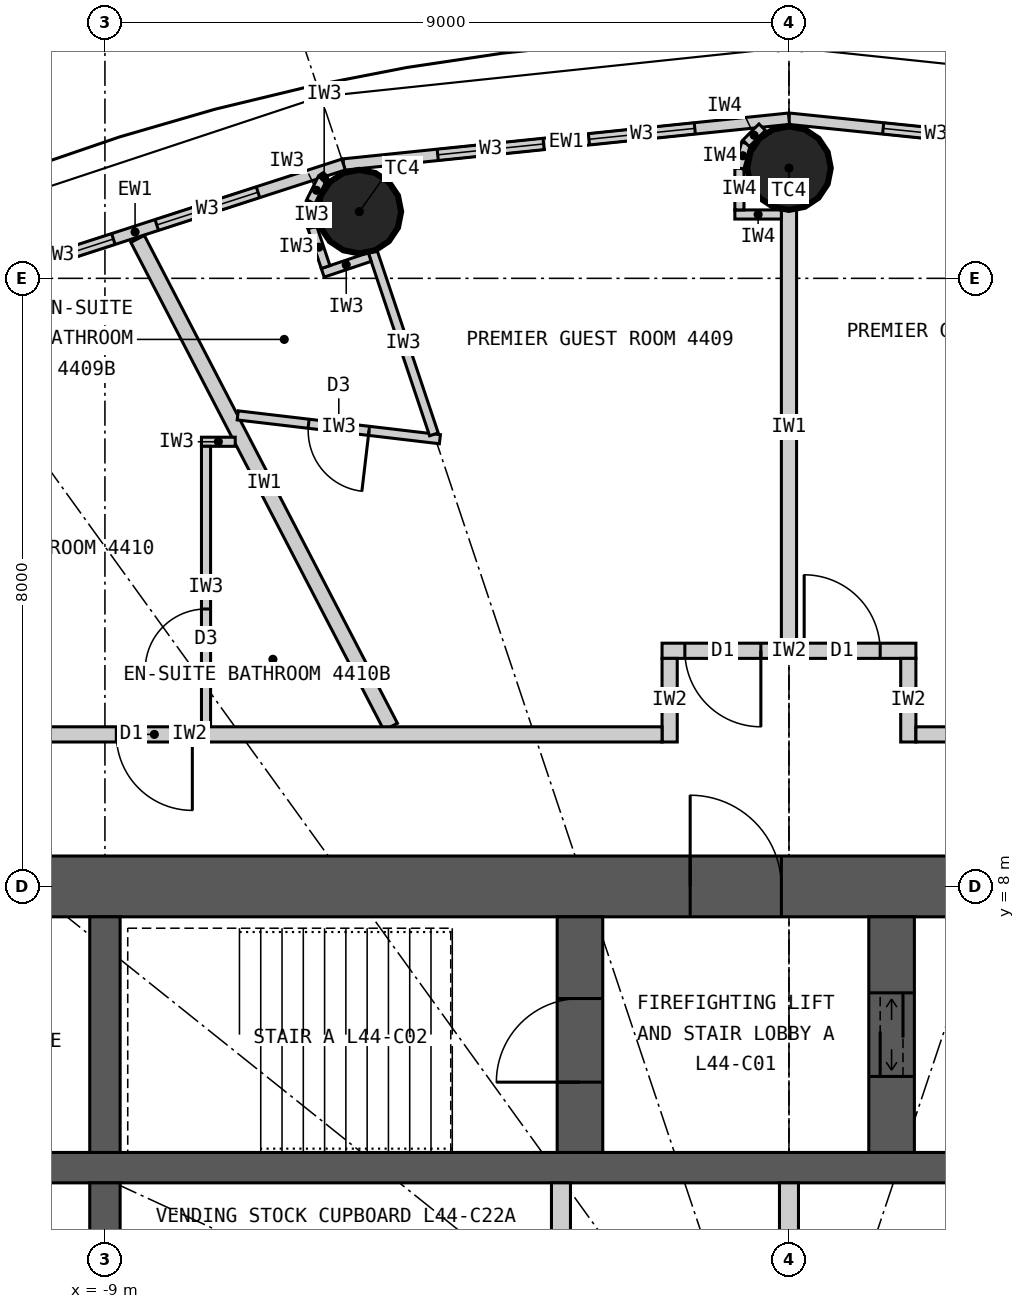
"""IFC4 building model, lengths in metres.
Left out: names, types, materials, properties, quantities, classifications, styles, units other than length and angle.
Written with IfcOpenShell. Run it as: python <this file> out.ifc"""

import sys

from ifc_helpers import new_model, si_unit, direction, frame, frame_2d, origin, origin_2d, place, context, subcontext, project, spatial, rectangle, circle, extrude, element, fill, save


model = new_model("IFC4")
c1 = context("Model", 3, precision=1e-05, world=origin(), true_north=direction((0.0, 1.0)))
c2 = subcontext(c1, "Body", "Model", "MODEL_VIEW")
j1 = project(units=[si_unit("LENGTHUNIT", "METRE"), si_unit("PLANEANGLEUNIT", "RADIAN")], contexts=[c1])
p1 = place(None, origin())
s1 = spatial("IfcSite", under=j1, at=p1, CompositionType="ELEMENT")
p2 = place(p1, origin())
s2 = spatial("IfcBuilding", under=s1, at=p2, CompositionType="ELEMENT")
p3 = place(p2, frame((0.0, 0.0, 166.5)))
s3 = spatial("IfcBuildingStorey", under=s2, at=p3, CompositionType="ELEMENT", Elevation=166.5)
for number, where, z_axis, x_axis in (
    (1, (0.0, 17.45, 0.0), (0.0, 0.0, 1.0), (1.0, 0.0, 0.0)),
    (2, (-5.653, 16.877, 0.0), (0.0, 0.0, 1.0), (1.0, 0.0, 0.0)),
):
    element("IfcColumn", number, at=place(p3, frame(where, z_axis=z_axis, x_axis=x_axis)), inside=s3, PredefinedType="COLUMN", context=c2, shape_type="SweptSolid", body=[
        extrude(circle(Radius=0.55, at=origin_2d()), origin(), (0.0, 0.0, 1.0), 3.3),
    ])
p4 = place(p3, frame((-12.4, 8.0, 0.0), z_axis=(0.0, 0.0, 1.0), x_axis=(1.0, 0.0, 0.0)))
e3 = element("IfcWall", 3, at=p4, inside=s3, PredefinedType="SHEAR", context=c2, shape_type="SweptSolid", body=[
    extrude(rectangle(XDim=24.8, YDim=0.8, at=frame_2d((12.4, 0.0))), origin(), (0.0, 0.0, 1.0), 3.3),
])
p5 = place(p4, frame((11.1, 0.0, 0.0)))
e4 = element("IfcOpeningElement", 4, at=p5, cuts=e3, PredefinedType="OPENING", context=c2, shape_type="SweptSolid", body=[
    extrude(rectangle(XDim=1.2, YDim=2.2, at=frame_2d((0.6, 1.1))), frame((0.0, 0.41, 0.0), z_axis=(0.0, -1.0, 0.0), x_axis=(1.0, 0.0, 0.0)), (0.0, 0.0, 1.0), 0.82),
])
p6 = place(p4, frame((18.7, 0.0, 0.0)))
e5 = element("IfcOpeningElement", 5, at=p6, cuts=e3, PredefinedType="OPENING", context=c2, shape_type="SweptSolid", body=[
    extrude(rectangle(XDim=0.9, YDim=2.2, at=frame_2d((0.45, 1.1))), frame((0.0, 0.41, 0.0), z_axis=(0.0, -1.0, 0.0), x_axis=(1.0, 0.0, 0.0)), (0.0, 0.0, 1.0), 0.82),
])
p7 = place(p3, frame((-11.6, 4.3, 0.0), z_axis=(0.0, 0.0, 1.0), x_axis=(1.0, 0.0, 0.0)))
e6 = element("IfcWall", 6, at=p7, inside=s3, PredefinedType="SHEAR", context=c2, shape_type="SweptSolid", body=[
    extrude(rectangle(XDim=23.2, YDim=0.4, at=frame_2d((11.6, 0.0))), origin(), (0.0, 0.0, 1.0), 3.3),
])
p8 = place(p3, frame((-9.0, 4.5, 0.0), z_axis=(0.0, 0.0, 1.0), x_axis=(0.0, 1.0, 0.0)))
e7 = element("IfcWall", 7, at=p8, inside=s3, PredefinedType="SHEAR", context=c2, shape_type="SweptSolid", body=[
    extrude(rectangle(XDim=3.1, YDim=0.4, at=frame_2d((1.55, 0.0))), origin(), (0.0, 0.0, 1.0), 3.3),
])
p9 = place(p3, frame((-9.0, 1.75, 0.0), z_axis=(0.0, 0.0, 1.0), x_axis=(0.0, 1.0, 0.0)))
e8 = element("IfcWall", 8, at=p9, inside=s3, PredefinedType="SHEAR", context=c2, shape_type="SweptSolid", body=[
    extrude(rectangle(XDim=2.35, YDim=0.4, at=frame_2d((1.175, 0.0))), origin(), (0.0, 0.0, 1.0), 3.3),
])
p10 = place(p3, frame((-2.75, 4.5, 0.0), z_axis=(0.0, 0.0, 1.0), x_axis=(0.0, 1.0, 0.0)))
e9 = element("IfcWall", 9, at=p10, inside=s3, PredefinedType="SHEAR", context=c2, shape_type="SweptSolid", body=[
    extrude(rectangle(XDim=3.1, YDim=0.6, at=frame_2d((1.55, 0.0))), origin(), (0.0, 0.0, 1.0), 3.3),
])
p11 = place(p10, frame((0.925, 0.0, 0.0)))
e10 = element("IfcOpeningElement", 10, at=p11, cuts=e9, PredefinedType="OPENING", context=c2, shape_type="SweptSolid", body=[
    extrude(rectangle(XDim=1.1, YDim=2.2, at=frame_2d((0.55, 1.1))), frame((0.0, 0.31, 0.0), z_axis=(0.0, -1.0, 0.0), x_axis=(1.0, 0.0, 0.0)), (0.0, 0.0, 1.0), 0.62),
])
p12 = place(p3, frame((1.35, 4.5, 0.0), z_axis=(0.0, 0.0, 1.0), x_axis=(0.0, 1.0, 0.0)))
e11 = element("IfcWall", 11, at=p12, inside=s3, PredefinedType="SHEAR", context=c2, shape_type="SweptSolid", body=[
    extrude(rectangle(XDim=3.1, YDim=0.6, at=frame_2d((1.55, 0.0))), origin(), (0.0, 0.0, 1.0), 3.3),
])
p13 = place(p12, frame((1.0, 0.0, 0.0)))
e12 = element("IfcOpeningElement", 12, at=p13, cuts=e11, PredefinedType="OPENING", context=c2, shape_type="SweptSolid", body=[
    extrude(rectangle(XDim=1.1, YDim=2.2, at=frame_2d((0.55, 1.1))), frame((0.0, 0.31, 0.0), z_axis=(0.0, -1.0, 0.0), x_axis=(1.0, 0.0, 0.0)), (0.0, 0.0, 1.0), 0.62),
])
for number, where, z_axis, x_axis in (
    (13, (-3.0, 1.75, 0.0), (0.0, 0.0, 1.0), (0.0, 1.0, 0.0)),
    (14, (0.0, 1.75, 0.0), (0.0, 0.0, 1.0), (0.0, 1.0, 0.0)),
):
    element("IfcWall", number, at=place(p3, frame(where, z_axis=z_axis, x_axis=x_axis)), inside=s3, PredefinedType="PARTITIONING", context=c2, shape_type="SweptSolid", body=[
        extrude(rectangle(XDim=2.35, YDim=0.25, at=frame_2d((1.175, 0.0))), origin(), (0.0, 0.0, 1.0), 3.3),
    ])
p14 = place(p3, frame((5.86, 17.497, 0.0), z_axis=(0.0, 0.0, 1.0), x_axis=(-0.994751738032, 0.102318032045, 0.0)))
e15 = element("IfcWall", 15, at=p14, inside=s3, PredefinedType="ELEMENTEDWALL", context=c2, shape_type="SweptSolid", body=[
    extrude(rectangle(XDim=5.891, YDim=0.15, at=frame_2d((2.946, 0.0))), origin(), (0.0, 0.0, 1.0), 3.12),
])
p15 = place(p14, frame((1.246, 0.0, 0.9)))
e16 = element("IfcOpeningElement", 16, at=p15, cuts=e15, PredefinedType="OPENING", context=c2, shape_type="SweptSolid", body=[
    extrude(rectangle(XDim=1.4, YDim=1.9, at=frame_2d((0.7, 0.95))), frame((0.0, 0.085, 0.0), z_axis=(0.0, -1.0, 0.0), x_axis=(1.0, 0.0, 0.0)), (0.0, 0.0, 1.0), 0.17),
])
p16 = place(p14, frame((3.246, 0.0, 0.9)))
e17 = element("IfcOpeningElement", 17, at=p16, cuts=e15, PredefinedType="OPENING", context=c2, shape_type="SweptSolid", body=[
    extrude(rectangle(XDim=1.4, YDim=1.9, at=frame_2d((0.7, 0.95))), frame((0.0, 0.085, 0.0), z_axis=(0.0, -1.0, 0.0), x_axis=(1.0, 0.0, 0.0)), (0.0, 0.0, 1.0), 0.17),
])
p17 = place(p3, frame((0.0, 18.1, 0.0), z_axis=(0.0, 0.0, 1.0), x_axis=(-0.994751738032, -0.102318032045, 0.0)))
e18 = element("IfcWall", 18, at=p17, inside=s3, PredefinedType="ELEMENTEDWALL", context=c2, shape_type="SweptSolid", body=[
    extrude(rectangle(XDim=5.891, YDim=0.15, at=frame_2d((2.946, 0.0))), origin(), (0.0, 0.0, 1.0), 3.12),
])
p18 = place(p17, frame((1.246, 0.0, 0.9)))
e19 = element("IfcOpeningElement", 19, at=p18, cuts=e18, PredefinedType="OPENING", context=c2, shape_type="SweptSolid", body=[
    extrude(rectangle(XDim=1.4, YDim=1.9, at=frame_2d((0.7, 0.95))), frame((0.0, 0.085, 0.0), z_axis=(0.0, -1.0, 0.0), x_axis=(1.0, 0.0, 0.0)), (0.0, 0.0, 1.0), 0.17),
])
p19 = place(p17, frame((3.246, 0.0, 0.9)))
e20 = element("IfcOpeningElement", 20, at=p19, cuts=e18, PredefinedType="OPENING", context=c2, shape_type="SweptSolid", body=[
    extrude(rectangle(XDim=1.4, YDim=1.9, at=frame_2d((0.7, 0.95))), frame((0.0, 0.085, 0.0), z_axis=(0.0, -1.0, 0.0), x_axis=(1.0, 0.0, 0.0)), (0.0, 0.0, 1.0), 0.17),
])
p20 = place(p3, frame((-5.86, 17.497, 0.0), z_axis=(0.0, 0.0, 1.0), x_axis=(-0.951432482129, -0.307857486429, 0.0)))
e21 = element("IfcWall", 21, at=p20, inside=s3, PredefinedType="ELEMENTEDWALL", context=c2, shape_type="SweptSolid", body=[
    extrude(rectangle(XDim=5.766, YDim=0.15, at=frame_2d((2.883, 0.0))), origin(), (0.0, 0.0, 1.0), 3.12),
])
p21 = place(p20, frame((1.183, 0.0, 0.9)))
e22 = element("IfcOpeningElement", 22, at=p21, cuts=e21, PredefinedType="OPENING", context=c2, shape_type="SweptSolid", body=[
    extrude(rectangle(XDim=1.4, YDim=1.9, at=frame_2d((0.7, 0.95))), frame((0.0, 0.085, 0.0), z_axis=(0.0, -1.0, 0.0), x_axis=(1.0, 0.0, 0.0)), (0.0, 0.0, 1.0), 0.17),
])
p22 = place(p20, frame((3.183, 0.0, 0.9)))
e23 = element("IfcOpeningElement", 23, at=p22, cuts=e21, PredefinedType="OPENING", context=c2, shape_type="SweptSolid", body=[
    extrude(rectangle(XDim=1.4, YDim=1.9, at=frame_2d((0.7, 0.95))), frame((0.0, 0.085, 0.0), z_axis=(0.0, -1.0, 0.0), x_axis=(1.0, 0.0, 0.0)), (0.0, 0.0, 1.0), 0.17),
])
p23 = place(p3, frame((0.0, 11.2, 0.0), z_axis=(0.0, 0.0, 1.0), x_axis=(0.0, 1.0, 0.0)))
e24 = element("IfcWall", 24, at=p23, inside=s3, PredefinedType="PARTITIONING", context=c2, shape_type="SweptSolid", body=[
    extrude(rectangle(XDim=5.7, YDim=0.2, at=frame_2d((2.85, 0.0))), origin(), (0.0, 0.0, 1.0), 2.42),
])
p24 = place(p3, frame((-5.24, 10.1, 0.0), z_axis=(0.0, 0.0, 1.0), x_axis=(-0.460532965373, 0.887642601391, 0.0)))
e25 = element("IfcWall", 25, at=p24, inside=s3, PredefinedType="PARTITIONING", context=c2, shape_type="SweptSolid", body=[
    extrude(rectangle(XDim=7.231, YDim=0.2, at=frame_2d((3.616, 0.0))), origin(), (0.0, 0.0, 1.0), 3.12),
])
p25 = place(p3, frame((-1.67, 11.1, 0.0), z_axis=(0.0, 0.0, 1.0), x_axis=(1.0, 0.0, 0.0)))
e26 = element("IfcWall", 26, at=p25, inside=s3, PredefinedType="PARTITIONING", context=c2, shape_type="SweptSolid", body=[
    extrude(rectangle(XDim=3.34, YDim=0.2, at=frame_2d((1.67, 0.0))), origin(), (0.0, 0.0, 1.0), 3.12),
])
p26 = place(p25, frame((1.87, 0.0, 0.0)))
e27 = element("IfcOpeningElement", 27, at=p26, cuts=e26, PredefinedType="OPENING", context=c2, shape_type="SweptSolid", body=[
    extrude(rectangle(XDim=1.0, YDim=2.2, at=frame_2d((0.5, 1.1))), frame((0.0, 0.11, 0.0), z_axis=(0.0, -1.0, 0.0), x_axis=(1.0, 0.0, 0.0)), (0.0, 0.0, 1.0), 0.22),
])
p27 = place(p25, frame((0.3, 0.0, 0.0)))
e28 = element("IfcOpeningElement", 28, at=p27, cuts=e26, PredefinedType="OPENING", context=c2, shape_type="SweptSolid", body=[
    extrude(rectangle(XDim=1.0, YDim=2.2, at=frame_2d((0.5, 1.1))), frame((0.0, 0.11, 0.0), z_axis=(0.0, -1.0, 0.0), x_axis=(1.0, 0.0, 0.0)), (0.0, 0.0, 1.0), 0.22),
])
for number, where, z_axis, x_axis in (
    (29, (-1.57, 9.9, 0.0), (0.0, 0.0, 1.0), (0.0, 1.0, 0.0)),
    (30, (1.57, 9.9, 0.0), (0.0, 0.0, 1.0), (0.0, 1.0, 0.0)),
):
    element("IfcWall", number, at=place(p3, frame(where, z_axis=z_axis, x_axis=x_axis)), inside=s3, PredefinedType="PARTITIONING", context=c2, shape_type="SweptSolid", body=[
        extrude(rectangle(XDim=1.1, YDim=0.2, at=frame_2d((0.55, 0.0))), origin(), (0.0, 0.0, 1.0), 3.12),
    ])
p28 = place(p3, frame((-7.253, 14.197, 0.0), z_axis=(0.0, 0.0, 1.0), x_axis=(0.993128188393, -0.117031625725, 0.0)))
e31 = element("IfcWall", 31, at=p28, inside=s3, PredefinedType="PARTITIONING", context=c2, shape_type="SweptSolid", body=[
    extrude(rectangle(XDim=2.678, YDim=0.12, at=frame_2d((1.339, 0.0))), origin(), (0.0, 0.0, 1.0), 3.12),
])
p29 = place(p28, frame((0.939, 0.0, 0.0)))
e32 = element("IfcOpeningElement", 32, at=p29, cuts=e31, PredefinedType="OPENING", context=c2, shape_type="SweptSolid", body=[
    extrude(rectangle(XDim=0.8, YDim=2.1, at=frame_2d((0.4, 1.05))), frame((0.0, 0.07, 0.0), z_axis=(0.0, -1.0, 0.0), x_axis=(1.0, 0.0, 0.0)), (0.0, 0.0, 1.0), 0.14),
])
p30 = place(p3, frame((-4.671, 13.948, 0.0), z_axis=(0.0, 0.0, 1.0), x_axis=(-0.317669167093, 0.948201613729, 0.0)))
e33 = element("IfcWall", 33, at=p30, inside=s3, PredefinedType="PARTITIONING", context=c2, shape_type="SweptSolid", body=[
    extrude(rectangle(XDim=2.54, YDim=0.12, at=frame_2d((1.27, 0.0))), origin(), (0.0, 0.0, 1.0), 2.42),
])
p31 = place(p3, frame((-5.516, 16.28, 0.0), z_axis=(0.0, 0.0, 1.0), x_axis=(-0.948157944392, -0.317799484717, 0.0)))
e34 = element("IfcWall", 34, at=p31, inside=s3, PredefinedType="PARTITIONING", context=c2, shape_type="SweptSolid", body=[
    extrude(rectangle(XDim=0.652, YDim=0.12, at=frame_2d((0.326, 0.0))), origin(), (0.0, 0.0, 1.0), 3.12),
])
p32 = place(p3, frame((-6.097, 16.149, 0.0), z_axis=(0.0, 0.0, 1.0), x_axis=(-0.317292604854, 0.948327687514, 0.0)))
e35 = element("IfcWall", 35, at=p32, inside=s3, PredefinedType="PARTITIONING", context=c2, shape_type="SweptSolid", body=[
    extrude(rectangle(XDim=0.55, YDim=0.12, at=frame_2d((0.275, 0.0))), origin(), (0.0, 0.0, 1.0), 3.12),
])
for number, where, z_axis, x_axis in (
    (36, (-6.271, 16.67, 0.0), (0.0, 0.0, 1.0), (-0.061, 0.998, 0.0)),
    (37, (-6.292, 17.007, 0.0), (0.0, 0.0, 1.0), (0.445, 0.895, 0.0)),
):
    element("IfcWall", number, at=place(p3, frame(where, z_axis=z_axis, x_axis=x_axis)), inside=s3, PredefinedType="PARTITIONING", context=c2, shape_type="SweptSolid", body=[
        extrude(rectangle(XDim=0.338, YDim=0.12, at=frame_2d((0.169, 0.0))), origin(), (0.0, 0.0, 1.0), 3.12),
    ])
p33 = place(p3, frame((-6.142, 17.31, 0.0), z_axis=(0.0, 0.0, 1.0), x_axis=(0.835039693181, 0.550189704386, 0.0)))
e38 = element("IfcWall", 38, at=p33, inside=s3, PredefinedType="PARTITIONING", context=c2, shape_type="SweptSolid", body=[
    extrude(rectangle(XDim=0.062, YDim=0.12, at=frame_2d((0.031, 0.0))), origin(), (0.0, 0.0, 1.0), 3.12),
])
p34 = place(p3, frame((-7.286, 13.85, 0.0), z_axis=(0.0, 0.0, 1.0), x_axis=(-1.0, 0.0, 0.0)))
e39 = element("IfcWall", 39, at=p34, inside=s3, PredefinedType="PARTITIONING", context=c2, shape_type="SweptSolid", body=[
    extrude(rectangle(XDim=0.444, YDim=0.12, at=frame_2d((0.222, 0.0))), origin(), (0.0, 0.0, 1.0), 3.12),
])
p35 = place(p3, frame((-7.67, 10.1, 0.0), z_axis=(0.0, 0.0, 1.0), x_axis=(0.0, 1.0, 0.0)))
e40 = element("IfcWall", 40, at=p35, inside=s3, PredefinedType="PARTITIONING", context=c2, shape_type="SweptSolid", body=[
    extrude(rectangle(XDim=3.69, YDim=0.12, at=frame_2d((1.845, 0.0))), origin(), (0.0, 0.0, 1.0), 3.12),
])
p36 = place(p35, frame((0.75, 0.0, 0.0)))
e41 = element("IfcOpeningElement", 41, at=p36, cuts=e40, PredefinedType="OPENING", context=c2, shape_type="SweptSolid", body=[
    extrude(rectangle(XDim=0.8, YDim=2.1, at=frame_2d((0.4, 1.05))), frame((0.0, 0.07, 0.0), z_axis=(0.0, -1.0, 0.0), x_axis=(1.0, 0.0, 0.0)), (0.0, 0.0, 1.0), 0.14),
])
p37 = place(p3, frame((-14.1, 10.0, 0.0), z_axis=(0.0, 0.0, 1.0), x_axis=(1.0, 0.0, 0.0)))
e42 = element("IfcWall", 42, at=p37, inside=s3, PredefinedType="PARTITIONING", context=c2, shape_type="SweptSolid", body=[
    extrude(rectangle(XDim=12.43, YDim=0.2, at=frame_2d((6.215, 0.0))), origin(), (0.0, 0.0, 1.0), 3.12),
])
p38 = place(p37, frame((5.25, 0.0, 0.0)))
e43 = element("IfcOpeningElement", 43, at=p38, cuts=e42, PredefinedType="OPENING", context=c2, shape_type="SweptSolid", body=[
    extrude(rectangle(XDim=1.0, YDim=2.2, at=frame_2d((0.5, 1.1))), frame((0.0, 0.11, 0.0), z_axis=(0.0, -1.0, 0.0), x_axis=(1.0, 0.0, 0.0)), (0.0, 0.0, 1.0), 0.22),
])
p39 = place(p3, frame((1.67, 10.0, 0.0), z_axis=(0.0, 0.0, 1.0), x_axis=(1.0, 0.0, 0.0)))
e44 = element("IfcWall", 44, at=p39, inside=s3, PredefinedType="PARTITIONING", context=c2, shape_type="SweptSolid", body=[
    extrude(rectangle(XDim=12.43, YDim=0.2, at=frame_2d((6.215, 0.0))), origin(), (0.0, 0.0, 1.0), 3.12),
])
p40 = place(p39, frame((9.655, 0.0, 0.0)))
e45 = element("IfcOpeningElement", 45, at=p40, cuts=e44, PredefinedType="OPENING", context=c2, shape_type="SweptSolid", body=[
    extrude(rectangle(XDim=1.0, YDim=2.2, at=frame_2d((0.5, 1.1))), frame((0.0, 0.11, 0.0), z_axis=(0.0, -1.0, 0.0), x_axis=(1.0, 0.0, 0.0)), (0.0, 0.0, 1.0), 0.22),
])
p41 = place(p3, frame((-0.1, 16.84, 0.0), z_axis=(0.0, 0.0, 1.0), x_axis=(-1.0, 0.0, 0.0)))
e46 = element("IfcWall", 46, at=p41, inside=s3, PredefinedType="PARTITIONING", context=c2, shape_type="SweptSolid", body=[
    extrude(rectangle(XDim=0.612, YDim=0.12, at=frame_2d((0.306, 0.0))), origin(), (0.0, 0.0, 1.0), 3.12),
])
p42 = place(p3, frame((-0.652, 16.9, 0.0), z_axis=(0.0, 0.0, 1.0), x_axis=(0.0, 1.0, 0.0)))
e47 = element("IfcWall", 47, at=p42, inside=s3, PredefinedType="PARTITIONING", context=c2, shape_type="SweptSolid", body=[
    extrude(rectangle(XDim=0.55, YDim=0.12, at=frame_2d((0.275, 0.0))), origin(), (0.0, 0.0, 1.0), 3.12),
])
p43 = place(p3, frame((-0.652, 17.45, 0.0), z_axis=(0.0, 0.0, 1.0), x_axis=(0.258832454679, 0.965922233104, 0.0)))
e48 = element("IfcWall", 48, at=p43, inside=s3, PredefinedType="PARTITIONING", context=c2, shape_type="SweptSolid", body=[
    extrude(rectangle(XDim=0.338, YDim=0.12, at=frame_2d((0.169, 0.0))), origin(), (0.0, 0.0, 1.0), 3.12),
])
p44 = place(p3, frame((-0.565, 17.776, 0.0), z_axis=(0.0, 0.0, 1.0), x_axis=(0.707106781187, 0.707106781187, 0.0)))
e49 = element("IfcWall", 49, at=p44, inside=s3, PredefinedType="PARTITIONING", context=c2, shape_type="SweptSolid", body=[
    extrude(rectangle(XDim=0.301, YDim=0.12, at=frame_2d((0.15, 0.0))), origin(), (0.0, 0.0, 1.0), 3.12),
])
p45 = place(p16, origin())
e50 = element("IfcWindow", 50, at=p45, inside=s3, PartitioningType="SINGLE_PANEL", PredefinedType="WINDOW", context=c2, shape_type="SweptSolid", body=[
    extrude(rectangle(XDim=1.4, YDim=1.9, at=frame_2d((0.7, 0.95))), frame((0.0, 0.03, 0.0), z_axis=(0.0, -1.0, 0.0), x_axis=(1.0, 0.0, 0.0)), (0.0, 0.0, 1.0), 0.06),
])
fill(e17, e50)
p46 = place(p18, origin())
e51 = element("IfcWindow", 51, at=p46, inside=s3, PartitioningType="SINGLE_PANEL", PredefinedType="WINDOW", context=c2, shape_type="SweptSolid", body=[
    extrude(rectangle(XDim=1.4, YDim=1.9, at=frame_2d((0.7, 0.95))), frame((0.0, 0.03, 0.0), z_axis=(0.0, -1.0, 0.0), x_axis=(1.0, 0.0, 0.0)), (0.0, 0.0, 1.0), 0.06),
])
fill(e19, e51)
p47 = place(p19, origin())
e52 = element("IfcWindow", 52, at=p47, inside=s3, PartitioningType="SINGLE_PANEL", PredefinedType="WINDOW", context=c2, shape_type="SweptSolid", body=[
    extrude(rectangle(XDim=1.4, YDim=1.9, at=frame_2d((0.7, 0.95))), frame((0.0, 0.03, 0.0), z_axis=(0.0, -1.0, 0.0), x_axis=(1.0, 0.0, 0.0)), (0.0, 0.0, 1.0), 0.06),
])
fill(e20, e52)
p48 = place(p21, origin())
e53 = element("IfcWindow", 53, at=p48, inside=s3, PartitioningType="SINGLE_PANEL", PredefinedType="WINDOW", context=c2, shape_type="SweptSolid", body=[
    extrude(rectangle(XDim=1.4, YDim=1.9, at=frame_2d((0.7, 0.95))), frame((0.0, 0.03, 0.0), z_axis=(0.0, -1.0, 0.0), x_axis=(1.0, 0.0, 0.0)), (0.0, 0.0, 1.0), 0.06),
])
fill(e22, e53)
p49 = place(p22, origin())
e54 = element("IfcWindow", 54, at=p49, inside=s3, PartitioningType="SINGLE_PANEL", PredefinedType="WINDOW", context=c2, shape_type="SweptSolid", body=[
    extrude(rectangle(XDim=1.4, YDim=1.9, at=frame_2d((0.7, 0.95))), frame((0.0, 0.03, 0.0), z_axis=(0.0, -1.0, 0.0), x_axis=(1.0, 0.0, 0.0)), (0.0, 0.0, 1.0), 0.06),
])
fill(e23, e54)
p50 = place(p26, origin())
e55 = element("IfcDoor", 55, at=p50, inside=s3, OperationType="SINGLE_SWING_LEFT", PredefinedType="DOOR", context=c2, shape_type="SweptSolid", body=[
    extrude(rectangle(XDim=1.0, YDim=2.2, at=frame_2d((0.5, 1.1))), frame((0.0, 0.025, 0.0), z_axis=(0.0, -1.0, 0.0), x_axis=(1.0, 0.0, 0.0)), (0.0, 0.0, 1.0), 0.05),
])
fill(e27, e55)
p51 = place(p29, origin())
e56 = element("IfcDoor", 56, at=p51, inside=s3, OperationType="SINGLE_SWING_RIGHT", PredefinedType="DOOR", context=c2, shape_type="SweptSolid", body=[
    extrude(rectangle(XDim=0.8, YDim=2.1, at=frame_2d((0.4, 1.05))), frame((0.0, 0.025, 0.0), z_axis=(0.0, -1.0, 0.0), x_axis=(1.0, 0.0, 0.0)), (0.0, 0.0, 1.0), 0.05),
])
fill(e32, e56)
p52 = place(p27, origin())
e57 = element("IfcDoor", 57, at=p52, inside=s3, OperationType="SINGLE_SWING_RIGHT", PredefinedType="DOOR", context=c2, shape_type="SweptSolid", body=[
    extrude(rectangle(XDim=1.0, YDim=2.2, at=frame_2d((0.5, 1.1))), frame((0.0, 0.025, 0.0), z_axis=(0.0, -1.0, 0.0), x_axis=(1.0, 0.0, 0.0)), (0.0, 0.0, 1.0), 0.05),
])
fill(e28, e57)
p53 = place(p36, origin())
e58 = element("IfcDoor", 58, at=p53, inside=s3, OperationType="SINGLE_SWING_LEFT", PredefinedType="DOOR", context=c2, shape_type="SweptSolid", body=[
    extrude(rectangle(XDim=0.8, YDim=2.1, at=frame_2d((0.4, 1.05))), frame((0.0, 0.025, 0.0), z_axis=(0.0, -1.0, 0.0), x_axis=(1.0, 0.0, 0.0)), (0.0, 0.0, 1.0), 0.05),
])
fill(e41, e58)
p54 = place(p38, origin())
e59 = element("IfcDoor", 59, at=p54, inside=s3, OperationType="SINGLE_SWING_RIGHT", PredefinedType="DOOR", context=c2, shape_type="SweptSolid", body=[
    extrude(rectangle(XDim=1.0, YDim=2.2, at=frame_2d((0.5, 1.1))), frame((0.0, 0.025, 0.0), z_axis=(0.0, -1.0, 0.0), x_axis=(1.0, 0.0, 0.0)), (0.0, 0.0, 1.0), 0.05),
])
fill(e43, e59)
p55 = place(p5, origin())
e60 = element("IfcDoor", 60, at=p55, inside=s3, OperationType="SINGLE_SWING_LEFT", PredefinedType="DOOR", context=c2, shape_type="SweptSolid", body=[
    extrude(rectangle(XDim=1.2, YDim=2.2, at=frame_2d((0.6, 1.1))), frame((0.0, 0.025, 0.0), z_axis=(0.0, -1.0, 0.0), x_axis=(1.0, 0.0, 0.0)), (0.0, 0.0, 1.0), 0.05),
])
fill(e4, e60)
p56 = place(p11, origin())
e61 = element("IfcDoor", 61, at=p56, inside=s3, OperationType="SINGLE_SWING_LEFT", PredefinedType="DOOR", context=c2, shape_type="SweptSolid", body=[
    extrude(rectangle(XDim=1.1, YDim=2.2, at=frame_2d((0.55, 1.1))), frame((0.0, 0.025, 0.0), z_axis=(0.0, -1.0, 0.0), x_axis=(1.0, 0.0, 0.0)), (0.0, 0.0, 1.0), 0.05),
])
fill(e10, e61)
p57 = place(p13, origin())
e62 = element("IfcDoor", 62, at=p57, inside=s3, OperationType="DOUBLE_DOOR_SLIDING", PredefinedType="DOOR", context=c2, shape_type="SweptSolid", body=[
    extrude(rectangle(XDim=1.1, YDim=2.2, at=frame_2d((0.55, 1.1))), frame((0.0, 0.025, 0.0), z_axis=(0.0, -1.0, 0.0), x_axis=(1.0, 0.0, 0.0)), (0.0, 0.0, 1.0), 0.05),
])
fill(e12, e62)
save(model, sys.argv[1])
